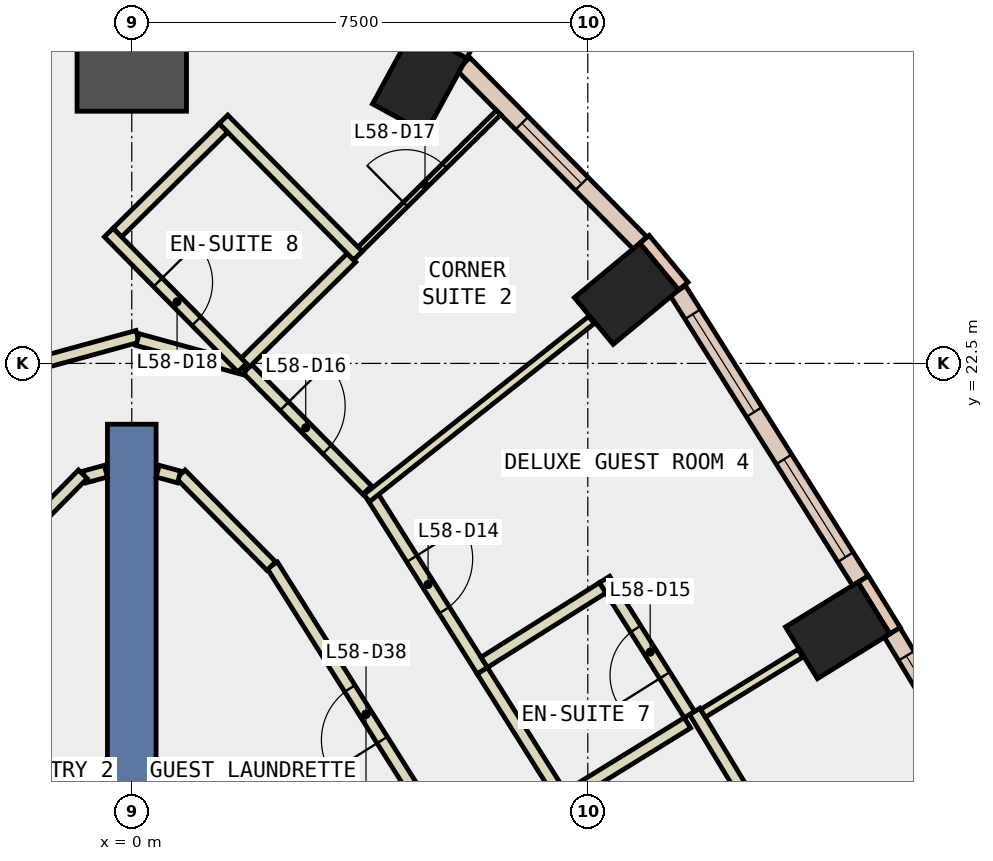
"""IFC4 building model, lengths in metres.
Left out: names, types, materials, properties, quantities, classifications, styles, units other than length and angle.
Written with IfcOpenShell. Run it as: python <this file> out.ifc"""

import sys

from ifc_helpers import new_model, si_unit, direction, frame, frame_2d, origin, origin_2d, place, context, subcontext, project, spatial, rectangle, extrude, element, fill, save


model = new_model("IFC4")
c1 = context("Model", 3, precision=1e-05, world=origin(), true_north=direction((0.0, 1.0)))
c2 = subcontext(c1, "Body", "Model", "MODEL_VIEW")
j1 = project(units=[si_unit("LENGTHUNIT", "METRE"), si_unit("PLANEANGLEUNIT", "RADIAN")], contexts=[c1])
p1 = place(None, origin())
s1 = spatial("IfcSite", under=j1, at=p1, CompositionType="ELEMENT")
p2 = place(p1, origin())
s2 = spatial("IfcBuilding", under=s1, at=p2, CompositionType="ELEMENT")
p3 = place(p2, frame((0.0, 0.0, 255.8)))
s3 = spatial("IfcBuildingStorey", under=s2, at=p3, CompositionType="ELEMENT", Elevation=255.8)
for number, where, z_axis, x_axis in (
    (1, (11.61, 18.109, -0.34), (0.0, 0.0, 1.0), (-0.526, 0.851, 0.0)),
    (2, (8.137, 23.645, -0.34), (0.0, 0.0, 1.0), (-0.639, 0.769, 0.0)),
    (3, (4.733, 27.143, -0.34), (0.0, 0.0, 1.0), (-0.878, 0.478, 0.0)),
):
    element("IfcColumn", number, at=place(p3, frame(where, z_axis=z_axis, x_axis=x_axis)), inside=s3, PredefinedType="COLUMN", context=c2, shape_type="SweptSolid", body=[
        extrude(rectangle(XDim=1.0, YDim=1.4, at=origin_2d()), origin(), (0.0, 0.0, 1.0), 3.6),
    ])
p4 = place(p3, frame((0.0, 27.547, -0.34), z_axis=(0.0, 0.0, 1.0), x_axis=(0.0, 1.0, 0.0)))
e4 = element("IfcColumn", 4, at=p4, inside=s3, PredefinedType="COLUMN", context=c2, shape_type="SweptSolid", body=[
    extrude(rectangle(XDim=1.8, YDim=1.8, at=origin_2d()), origin(), (0.0, 0.0, 1.0), 3.6),
])
p5 = place(p3, frame((0.0, 12.5, -0.34), z_axis=(0.0, 0.0, 1.0), x_axis=(0.0, 1.0, 0.0)))
e5 = element("IfcWall", 5, at=p5, inside=s3, PredefinedType="SHEAR", context=c2, shape_type="SweptSolid", body=[
    extrude(rectangle(XDim=9.0, YDim=0.8, at=frame_2d((4.5, 0.0))), origin(), (0.0, 0.0, 1.0), 3.6),
])
p6 = place(p3, frame((5.555, 27.606, 0.0), z_axis=(0.0, 0.0, 1.0), x_axis=(-0.878250009632, 0.478201757191, 0.0)))
e6 = element("IfcWall", 6, at=p6, inside=s3, PredefinedType="STANDARD", context=c2, shape_type="SweptSolid", body=[
    extrude(rectangle(XDim=1.0, YDim=0.2, at=frame_2d((0.5, 0.0))), origin(), (0.0, 0.0, 1.0), 3.26),
])
p7 = place(p3, frame((12.554, 18.104, 0.0), z_axis=(0.0, 0.0, 1.0), x_axis=(-0.525648735675, 0.850701714282, 0.0)))
e7 = element("IfcWall", 7, at=p7, inside=s3, PredefinedType="STANDARD", context=c2, shape_type="SweptSolid", body=[
    extrude(rectangle(XDim=1.0, YDim=0.2, at=frame_2d((0.5, 0.0))), origin(), (0.0, 0.0, 1.0), 3.26),
])
p8 = place(p3, frame((9.071, 23.771, 0.0), z_axis=(0.0, 0.0, 1.0), x_axis=(-0.637972365578, 0.770059257953, 0.0)))
e8 = element("IfcWall", 8, at=p8, inside=s3, PredefinedType="STANDARD", context=c2, shape_type="SweptSolid", body=[
    extrude(rectangle(XDim=1.0, YDim=0.2, at=frame_2d((0.5, 0.0))), origin(), (0.0, 0.0, 1.0), 3.26),
])
p9 = place(p3, frame((15.399, 13.277, 0.0), z_axis=(0.0, 0.0, 1.0), x_axis=(-0.516269519619, 0.856426169096, 0.0)))
e9 = element("IfcWall", 9, at=p9, inside=s3, PredefinedType="STANDARD", context=c2, shape_type="SweptSolid", body=[
    extrude(rectangle(XDim=5.603, YDim=0.3, at=frame_2d((2.802, 0.0))), origin(), (0.0, 0.0, 1.0), 3.26),
])
p10 = place(p9, frame((0.451, 0.0, 0.9)))
e10 = element("IfcOpeningElement", 10, at=p10, cuts=e9, PredefinedType="OPENING", context=c2, shape_type="SweptSolid", body=[
    extrude(rectangle(XDim=1.9, YDim=2.0, at=frame_2d((0.95, 1.0))), frame((0.0, 0.16, 0.0), z_axis=(0.0, -1.0, 0.0), x_axis=(1.0, 0.0, 0.0)), (0.0, 0.0, 1.0), 0.32),
])
p11 = place(p9, frame((3.253, 0.0, 0.9)))
e11 = element("IfcOpeningElement", 11, at=p11, cuts=e9, PredefinedType="OPENING", context=c2, shape_type="SweptSolid", body=[
    extrude(rectangle(XDim=1.9, YDim=2.0, at=frame_2d((0.95, 1.0))), frame((0.0, 0.16, 0.0), z_axis=(0.0, -1.0, 0.0), x_axis=(1.0, 0.0, 0.0)), (0.0, 0.0, 1.0), 0.32),
])
p12 = place(p3, frame((11.983, 18.926, 0.0), z_axis=(0.0, 0.0, 1.0), x_axis=(-0.532558226688, 0.846393369059, 0.0)))
e12 = element("IfcWall", 12, at=p12, inside=s3, PredefinedType="STANDARD", context=c2, shape_type="SweptSolid", body=[
    extrude(rectangle(XDim=5.637, YDim=0.3, at=frame_2d((2.818, 0.0))), origin(), (0.0, 0.0, 1.0), 3.26),
])
p13 = place(p12, frame((0.459, 0.0, 0.9)))
e13 = element("IfcOpeningElement", 13, at=p13, cuts=e12, PredefinedType="OPENING", context=c2, shape_type="SweptSolid", body=[
    extrude(rectangle(XDim=1.9, YDim=2.0, at=frame_2d((0.95, 1.0))), frame((0.0, 0.16, 0.0), z_axis=(0.0, -1.0, 0.0), x_axis=(1.0, 0.0, 0.0)), (0.0, 0.0, 1.0), 0.32),
])
p14 = place(p12, frame((3.278, 0.0, 0.9)))
e14 = element("IfcOpeningElement", 14, at=p14, cuts=e12, PredefinedType="OPENING", context=c2, shape_type="SweptSolid", body=[
    extrude(rectangle(XDim=1.9, YDim=2.0, at=frame_2d((0.95, 1.0))), frame((0.0, 0.16, 0.0), z_axis=(0.0, -1.0, 0.0), x_axis=(1.0, 0.0, 0.0)), (0.0, 0.0, 1.0), 0.32),
])
p15 = place(p3, frame((8.361, 24.48, 0.0), z_axis=(0.0, 0.0, 1.0), x_axis=(-0.702488411246, 0.711695181989, 0.0)))
e15 = element("IfcWall", 15, at=p15, inside=s3, PredefinedType="STANDARD", context=c2, shape_type="SweptSolid", body=[
    extrude(rectangle(XDim=4.137, YDim=0.3, at=frame_2d((2.068, 0.0))), origin(), (0.0, 0.0, 1.0), 3.26),
])
p16 = place(p15, frame((1.368, 0.0, 0.9)))
e16 = element("IfcOpeningElement", 16, at=p16, cuts=e15, PredefinedType="OPENING", context=c2, shape_type="SweptSolid", body=[
    extrude(rectangle(XDim=1.4, YDim=2.0, at=frame_2d((0.7, 1.0))), frame((0.0, 0.16, 0.0), z_axis=(0.0, -1.0, 0.0), x_axis=(1.0, 0.0, 0.0)), (0.0, 0.0, 1.0), 0.32),
])
p17 = place(p3, frame((5.394, 14.281, 0.0), z_axis=(0.0, 0.0, 1.0), x_axis=(-0.532551510955, 0.846397594621, 0.0)))
e17 = element("IfcWall", 17, at=p17, inside=s3, PredefinedType="PARTITIONING", context=c2, shape_type="SweptSolid", body=[
    extrude(rectangle(XDim=5.789, YDim=0.2, at=frame_2d((2.895, 0.0))), origin(), (0.0, 0.0, 1.0), 3.26),
])
p18 = place(p17, frame((2.394, 0.0, 0.0)))
e18 = element("IfcOpeningElement", 18, at=p18, cuts=e17, PredefinedType="OPENING", context=c2, shape_type="SweptSolid", body=[
    extrude(rectangle(XDim=1.0, YDim=2.1, at=frame_2d((0.5, 1.05))), frame((0.0, 0.11, 0.0), z_axis=(0.0, -1.0, 0.0), x_axis=(1.0, 0.0, 0.0)), (0.0, 0.0, 1.0), 0.22),
])
p19 = place(p3, frame((2.294, 19.167, 0.0), z_axis=(0.0, 0.0, 1.0), x_axis=(-0.70213913596, 0.712039769784, 0.0)))
e19 = element("IfcWall", 19, at=p19, inside=s3, PredefinedType="PARTITIONING", context=c2, shape_type="SweptSolid", body=[
    extrude(rectangle(XDim=2.121, YDim=0.2, at=frame_2d((1.06, 0.0))), origin(), (0.0, 0.0, 1.0), 3.26),
])
for number, where, z_axis, x_axis in (
    (20, (0.778, 20.632, 0.0), (0.0, 0.0, 1.0), (-0.965, 0.263, 0.0)),
    (21, (-0.426, 20.728, 0.0), (0.0, 0.0, 1.0), (-0.965, -0.263, 0.0)),
):
    element("IfcWall", number, at=place(p3, frame(where, z_axis=z_axis, x_axis=x_axis)), inside=s3, PredefinedType="PARTITIONING", context=c2, shape_type="SweptSolid", body=[
        extrude(rectangle(XDim=0.365, YDim=0.2, at=frame_2d((0.183, 0.0))), origin(), (0.0, 0.0, 1.0), 3.26),
    ])
p20 = place(p3, frame((-0.805, 20.677, 0.0), z_axis=(0.0, 0.0, 1.0), x_axis=(-0.70213913596, -0.712039769784, 0.0)))
e22 = element("IfcWall", 22, at=p20, inside=s3, PredefinedType="PARTITIONING", context=c2, shape_type="SweptSolid", body=[
    extrude(rectangle(XDim=2.121, YDim=0.2, at=frame_2d((1.06, 0.0))), origin(), (0.0, 0.0, 1.0), 3.26),
])
p21 = place(p3, frame((3.928, 20.367, 0.0), z_axis=(0.0, 0.0, 1.0), x_axis=(0.532616247911, -0.846356858814, 0.0)))
e23 = element("IfcWall", 23, at=p21, inside=s3, PredefinedType="PARTITIONING", context=c2, shape_type="SweptSolid", body=[
    extrude(rectangle(XDim=3.451, YDim=0.2, at=frame_2d((1.726, 0.0))), origin(), (0.0, 0.0, 1.0), 3.26),
])
p22 = place(p21, frame((1.275, 0.0, 0.0)))
e24 = element("IfcOpeningElement", 24, at=p22, cuts=e23, PredefinedType="OPENING", context=c2, shape_type="SweptSolid", body=[
    extrude(rectangle(XDim=1.0, YDim=2.1, at=frame_2d((0.5, 1.05))), frame((0.0, 0.11, 0.0), z_axis=(0.0, -1.0, 0.0), x_axis=(1.0, 0.0, 0.0)), (0.0, 0.0, 1.0), 0.22),
])
p23 = place(p3, frame((5.766, 17.446, 0.0), z_axis=(0.0, 0.0, 1.0), x_axis=(0.532437006176, -0.846469629966, 0.0)))
e25 = element("IfcWall", 25, at=p23, inside=s3, PredefinedType="PARTITIONING", context=c2, shape_type="SweptSolid", body=[
    extrude(rectangle(XDim=2.599, YDim=0.2, at=frame_2d((1.299, 0.0))), origin(), (0.0, 0.0, 1.0), 3.26),
])
p24 = place(p3, frame((1.851, 22.464, 0.0), z_axis=(0.0, 0.0, 1.0), x_axis=(0.70237969133, -0.711802479068, 0.0)))
e26 = element("IfcWall", 26, at=p24, inside=s3, PredefinedType="PARTITIONING", context=c2, shape_type="SweptSolid", body=[
    extrude(rectangle(XDim=2.876, YDim=0.2, at=frame_2d((1.438, 0.0))), origin(), (0.0, 0.0, 1.0), 3.26),
])
p25 = place(p24, frame((0.938, 0.0, 0.0)))
e27 = element("IfcOpeningElement", 27, at=p25, cuts=e26, PredefinedType="OPENING", context=c2, shape_type="SweptSolid", body=[
    extrude(rectangle(XDim=1.0, YDim=2.1, at=frame_2d((0.5, 1.05))), frame((0.0, 0.11, 0.0), z_axis=(0.0, -1.0, 0.0), x_axis=(1.0, 0.0, 0.0)), (0.0, 0.0, 1.0), 0.22),
])
p26 = place(p3, frame((-1.825, 22.419, 0.0), z_axis=(0.0, 0.0, 1.0), x_axis=(0.964477541401, 0.26416485787, 0.0)))
e28 = element("IfcWall", 28, at=p26, inside=s3, PredefinedType="PARTITIONING", context=c2, shape_type="SweptSolid", body=[
    extrude(rectangle(XDim=1.992, YDim=0.2, at=frame_2d((0.996, 0.0))), origin(), (0.0, 0.0, 1.0), 3.26),
])
p27 = place(p3, frame((0.096, 22.892, 0.0), z_axis=(0.0, 0.0, 1.0), x_axis=(0.964519582336, -0.264011316595, 0.0)))
e29 = element("IfcWall", 29, at=p27, inside=s3, PredefinedType="PARTITIONING", context=c2, shape_type="SweptSolid", body=[
    extrude(rectangle(XDim=1.849, YDim=0.2, at=frame_2d((0.924, 0.0))), origin(), (0.0, 0.0, 1.0), 3.26),
])
p28 = place(p3, frame((10.408, 14.874, 0.0), z_axis=(0.0, 0.0, 1.0), x_axis=(-0.516768967276, 0.856124894195, 0.0)))
e30 = element("IfcWall", 30, at=p28, inside=s3, PredefinedType="PARTITIONING", context=c2, shape_type="SweptSolid", body=[
    extrude(rectangle(XDim=2.225, YDim=0.2, at=frame_2d((1.113, 0.0))), origin(), (0.0, 0.0, 1.0), 3.26),
])
p29 = place(p3, frame((9.395, 16.746, 0.0), z_axis=(0.0, 0.0, 1.0), x_axis=(0.851524542888, 0.524314745987, 0.0)))
e31 = element("IfcWall", 31, at=p29, inside=s3, PredefinedType="PARTITIONING", context=c2, shape_type="SweptSolid", body=[
    extrude(rectangle(XDim=1.88, YDim=0.15, at=frame_2d((0.94, 0.0))), origin(), (0.0, 0.0, 1.0), 3.26),
])
p30 = place(p3, frame((7.097, 15.33, 0.0), z_axis=(0.0, 0.0, 1.0), x_axis=(0.851207242031, 0.524829716302, 0.0)))
e32 = element("IfcWall", 32, at=p30, inside=s3, PredefinedType="PARTITIONING", context=c2, shape_type="SweptSolid", body=[
    extrude(rectangle(XDim=2.399, YDim=0.2, at=frame_2d((1.199, 0.0))), origin(), (0.0, 0.0, 1.0), 3.26),
])
p31 = place(p3, frame((9.172, 16.725, 0.0), z_axis=(0.0, 0.0, 1.0), x_axis=(-0.532329646536, 0.846537150643, 0.0)))
e33 = element("IfcWall", 33, at=p31, inside=s3, PredefinedType="PARTITIONING", context=c2, shape_type="SweptSolid", body=[
    extrude(rectangle(XDim=2.625, YDim=0.2, at=frame_2d((1.312, 0.0))), origin(), (0.0, 0.0, 1.0), 3.26),
])
p32 = place(p31, frame((0.763, 0.0, 0.0)))
e34 = element("IfcOpeningElement", 34, at=p32, cuts=e33, PredefinedType="OPENING", context=c2, shape_type="SweptSolid", body=[
    extrude(rectangle(XDim=0.9, YDim=2.1, at=frame_2d((0.45, 1.05))), frame((0.0, 0.11, 0.0), z_axis=(0.0, -1.0, 0.0), x_axis=(1.0, 0.0, 0.0)), (0.0, 0.0, 1.0), 0.22),
])
p33 = place(p3, frame((7.744, 18.809, 0.0), z_axis=(0.0, 0.0, 1.0), x_axis=(-0.846360434059, -0.532610566605, 0.0)))
e35 = element("IfcWall", 35, at=p33, inside=s3, PredefinedType="PARTITIONING", context=c2, shape_type="SweptSolid", body=[
    extrude(rectangle(XDim=2.3, YDim=0.2, at=frame_2d((1.15, 0.0))), origin(), (0.0, 0.0, 1.0), 3.26),
])
p34 = place(p3, frame((3.863, 20.284, 0.0), z_axis=(0.0, 0.0, 1.0), x_axis=(0.783618453885, 0.621242399335, 0.0)))
e36 = element("IfcWall", 36, at=p34, inside=s3, PredefinedType="PARTITIONING", context=c2, shape_type="SweptSolid", body=[
    extrude(rectangle(XDim=4.717, YDim=0.15, at=frame_2d((2.358, 0.0))), origin(), (0.0, 0.0, 1.0), 3.26),
])
p35 = place(p3, frame((3.613, 24.237, 0.0), z_axis=(0.0, 0.0, 1.0), x_axis=(0.711651188682, 0.702532978335, 0.0)))
e37 = element("IfcWall", 37, at=p35, inside=s3, PredefinedType="PARTITIONING", context=c2, shape_type="SweptSolid", body=[
    extrude(rectangle(XDim=3.4, YDim=0.1, at=frame_2d((1.7, 0.0))), origin(), (0.0, 0.0, 1.0), 3.26),
])
p36 = place(p35, frame((1.25, 0.0, 0.0)))
e38 = element("IfcOpeningElement", 38, at=p36, cuts=e37, PredefinedType="OPENING", context=c2, shape_type="SweptSolid", body=[
    extrude(rectangle(XDim=0.9, YDim=2.1, at=frame_2d((0.45, 1.05))), frame((0.0, 0.06, 0.0), z_axis=(0.0, -1.0, 0.0), x_axis=(1.0, 0.0, 0.0)), (0.0, 0.0, 1.0), 0.12),
])
p37 = place(p3, frame((1.798, 22.446, 0.0), z_axis=(0.0, 0.0, 1.0), x_axis=(0.711782817297, 0.702399616316, 0.0)))
e39 = element("IfcWall", 39, at=p37, inside=s3, PredefinedType="PARTITIONING", context=c2, shape_type="SweptSolid", body=[
    extrude(rectangle(XDim=2.55, YDim=0.2, at=frame_2d((1.275, 0.0))), origin(), (0.0, 0.0, 1.0), 3.26),
])
p38 = place(p3, frame((3.719, 24.272, 0.0), z_axis=(0.0, 0.0, 1.0), x_axis=(-0.70232328337, 0.711858135893, 0.0)))
e40 = element("IfcWall", 40, at=p38, inside=s3, PredefinedType="PARTITIONING", context=c2, shape_type="SweptSolid", body=[
    extrude(rectangle(XDim=3.149, YDim=0.2, at=frame_2d((1.575, 0.0))), origin(), (0.0, 0.0, 1.0), 3.26),
])
p39 = place(p3, frame((1.506, 26.372, 0.0), z_axis=(0.0, 0.0, 1.0), x_axis=(-0.711773999329, -0.702408551969, 0.0)))
e41 = element("IfcWall", 41, at=p39, inside=s3, PredefinedType="PARTITIONING", context=c2, shape_type="SweptSolid", body=[
    extrude(rectangle(XDim=2.45, YDim=0.2, at=frame_2d((1.225, 0.0))), origin(), (0.0, 0.0, 1.0), 3.26),
])
p40 = place(p3, frame((-0.379, 24.652, 0.0), z_axis=(0.0, 0.0, 1.0), x_axis=(0.702559610983, -0.711624896286, 0.0)))
e42 = element("IfcWall", 42, at=p40, inside=s3, PredefinedType="PARTITIONING", context=c2, shape_type="SweptSolid", body=[
    extrude(rectangle(XDim=3.124, YDim=0.2, at=frame_2d((1.562, 0.0))), origin(), (0.0, 0.0, 1.0), 3.26),
])
p41 = place(p40, frame((1.15, 0.0, 0.0)))
e43 = element("IfcOpeningElement", 43, at=p41, cuts=e42, PredefinedType="OPENING", context=c2, shape_type="SweptSolid", body=[
    extrude(rectangle(XDim=0.9, YDim=2.1, at=frame_2d((0.45, 1.05))), frame((0.0, 0.11, 0.0), z_axis=(0.0, -1.0, 0.0), x_axis=(1.0, 0.0, 0.0)), (0.0, 0.0, 1.0), 0.22),
])
p42 = place(p11, origin())
e44 = element("IfcWindow", 44, at=p42, inside=s3, PartitioningType="SINGLE_PANEL", PredefinedType="WINDOW", context=c2, shape_type="SweptSolid", body=[
    extrude(rectangle(XDim=1.9, YDim=2.0, at=frame_2d((0.95, 1.0))), frame((0.0, 0.03, 0.0), z_axis=(0.0, -1.0, 0.0), x_axis=(1.0, 0.0, 0.0)), (0.0, 0.0, 1.0), 0.06),
])
fill(e11, e44)
p43 = place(p13, origin())
e45 = element("IfcWindow", 45, at=p43, inside=s3, PartitioningType="SINGLE_PANEL", PredefinedType="WINDOW", context=c2, shape_type="SweptSolid", body=[
    extrude(rectangle(XDim=1.9, YDim=2.0, at=frame_2d((0.95, 1.0))), frame((0.0, 0.03, 0.0), z_axis=(0.0, -1.0, 0.0), x_axis=(1.0, 0.0, 0.0)), (0.0, 0.0, 1.0), 0.06),
])
fill(e13, e45)
p44 = place(p14, origin())
e46 = element("IfcWindow", 46, at=p44, inside=s3, PartitioningType="SINGLE_PANEL", PredefinedType="WINDOW", context=c2, shape_type="SweptSolid", body=[
    extrude(rectangle(XDim=1.9, YDim=2.0, at=frame_2d((0.95, 1.0))), frame((0.0, 0.03, 0.0), z_axis=(0.0, -1.0, 0.0), x_axis=(1.0, 0.0, 0.0)), (0.0, 0.0, 1.0), 0.06),
])
fill(e14, e46)
p45 = place(p16, origin())
e47 = element("IfcWindow", 47, at=p45, inside=s3, PartitioningType="SINGLE_PANEL", PredefinedType="WINDOW", context=c2, shape_type="SweptSolid", body=[
    extrude(rectangle(XDim=1.4, YDim=2.0, at=frame_2d((0.7, 1.0))), frame((0.0, 0.03, 0.0), z_axis=(0.0, -1.0, 0.0), x_axis=(1.0, 0.0, 0.0)), (0.0, 0.0, 1.0), 0.06),
])
fill(e16, e47)
p46 = place(p22, origin())
e48 = element("IfcDoor", 48, at=p46, inside=s3, OperationType="SINGLE_SWING_LEFT", PredefinedType="DOOR", context=c2, shape_type="SweptSolid", body=[
    extrude(rectangle(XDim=1.0, YDim=2.1, at=frame_2d((0.5, 1.05))), frame((0.0, 0.025, 0.0), z_axis=(0.0, -1.0, 0.0), x_axis=(1.0, 0.0, 0.0)), (0.0, 0.0, 1.0), 0.05),
])
fill(e24, e48)
p47 = place(p32, origin())
e49 = element("IfcDoor", 49, at=p47, inside=s3, OperationType="SINGLE_SWING_LEFT", PredefinedType="DOOR", context=c2, shape_type="SweptSolid", body=[
    extrude(rectangle(XDim=0.9, YDim=2.1, at=frame_2d((0.45, 1.05))), frame((0.0, 0.025, 0.0), z_axis=(0.0, -1.0, 0.0), x_axis=(1.0, 0.0, 0.0)), (0.0, 0.0, 1.0), 0.05),
])
fill(e34, e49)
p48 = place(p25, origin())
e50 = element("IfcDoor", 50, at=p48, inside=s3, OperationType="SINGLE_SWING_LEFT", PredefinedType="DOOR", context=c2, shape_type="SweptSolid", body=[
    extrude(rectangle(XDim=1.0, YDim=2.1, at=frame_2d((0.5, 1.05))), frame((0.0, 0.025, 0.0), z_axis=(0.0, -1.0, 0.0), x_axis=(1.0, 0.0, 0.0)), (0.0, 0.0, 1.0), 0.05),
])
fill(e27, e50)
p49 = place(p36, origin())
e51 = element("IfcDoor", 51, at=p49, inside=s3, OperationType="SINGLE_SWING_RIGHT", PredefinedType="DOOR", context=c2, shape_type="SweptSolid", body=[
    extrude(rectangle(XDim=0.9, YDim=2.1, at=frame_2d((0.45, 1.05))), frame((0.0, 0.025, 0.0), z_axis=(0.0, -1.0, 0.0), x_axis=(1.0, 0.0, 0.0)), (0.0, 0.0, 1.0), 0.05),
])
fill(e38, e51)
p50 = place(p41, origin())
e52 = element("IfcDoor", 52, at=p50, inside=s3, OperationType="SINGLE_SWING_RIGHT", PredefinedType="DOOR", context=c2, shape_type="SweptSolid", body=[
    extrude(rectangle(XDim=0.9, YDim=2.1, at=frame_2d((0.45, 1.05))), frame((0.0, 0.025, 0.0), z_axis=(0.0, -1.0, 0.0), x_axis=(1.0, 0.0, 0.0)), (0.0, 0.0, 1.0), 0.05),
])
fill(e43, e52)
p51 = place(p18, origin())
e53 = element("IfcDoor", 53, at=p51, inside=s3, OperationType="SINGLE_SWING_LEFT", PredefinedType="DOOR", context=c2, shape_type="SweptSolid", body=[
    extrude(rectangle(XDim=1.0, YDim=2.1, at=frame_2d((0.5, 1.05))), frame((0.0, 0.025, 0.0), z_axis=(0.0, -1.0, 0.0), x_axis=(1.0, 0.0, 0.0)), (0.0, 0.0, 1.0), 0.05),
])
fill(e18, e53)
save(model, sys.argv[1])
